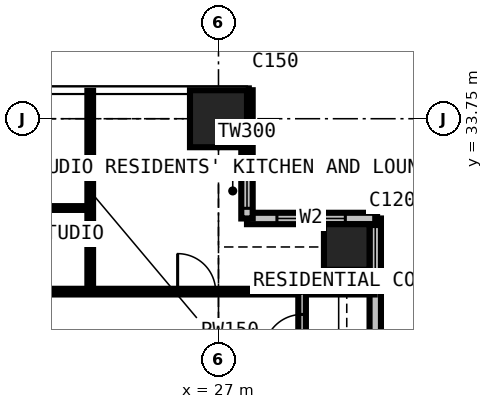
"""IFC4 building model, lengths in metres.
Left out: names, types, materials, properties, quantities, classifications, styles, units other than length and angle.
Written with IfcOpenShell. Run it as: python <this file> out.ifc"""

import sys

from ifc_helpers import new_model, si_unit, direction, frame, frame_2d, origin, origin_2d, place, context, subcontext, project, spatial, rectangle, extrude, element, fill, save


model = new_model("IFC4")
c1 = context("Model", 3, precision=1e-05, world=origin(), true_north=direction((0.0, 1.0)))
c2 = subcontext(c1, "Body", "Model", "MODEL_VIEW")
j1 = project(units=[si_unit("LENGTHUNIT", "METRE"), si_unit("PLANEANGLEUNIT", "RADIAN")], contexts=[c1])
p1 = place(None, origin())
s1 = spatial("IfcSite", under=j1, at=p1, CompositionType="ELEMENT")
p2 = place(p1, origin())
s2 = spatial("IfcBuilding", under=s1, at=p2, CompositionType="ELEMENT")
p3 = place(p2, frame((0.0, 0.0, 160.2)))
s3 = spatial("IfcBuildingStorey", under=s2, at=p3, CompositionType="ELEMENT", Elevation=160.2)
p4 = place(p3, frame((27.0, 33.75, 0.0), z_axis=(0.0, 0.0, 1.0), x_axis=(1.0, 0.0, 0.0)))
e1 = element("IfcColumn", 1, at=p4, inside=s3, PredefinedType="COLUMN", context=c2, shape_type="SweptSolid", body=[
    extrude(rectangle(XDim=1.5, YDim=1.5, at=origin_2d()), origin(), (0.0, 0.0, 1.0), 3.6),
])
p5 = place(p3, frame((30.375, 30.375, 0.0), z_axis=(0.0, 0.0, 1.0), x_axis=(1.0, 0.0, 0.0)))
e2 = element("IfcColumn", 2, at=p5, inside=s3, PredefinedType="COLUMN", context=c2, shape_type="SweptSolid", body=[
    extrude(rectangle(XDim=1.2, YDim=1.2, at=origin_2d()), origin(), (0.0, 0.0, 1.0), 3.6),
])
p6 = place(p3, frame((31.125, 27.75, 0.0), z_axis=(0.0, 0.0, 1.0), x_axis=(0.0, 1.0, 0.0)))
e3 = element("IfcWall", 3, at=p6, inside=s3, PredefinedType="SOLIDWALL", context=c2, shape_type="SweptSolid", body=[
    extrude(rectangle(XDim=3.375, YDim=0.3, at=frame_2d((1.688, 0.0))), origin(), (0.0, 0.0, 1.0), 3.375),
])
p7 = place(p6, frame((1.663, 0.0, 0.9)))
e4 = element("IfcOpeningElement", 4, at=p7, cuts=e3, PredefinedType="OPENING", context=c2, shape_type="SweptSolid", body=[
    extrude(rectangle(XDim=1.5, YDim=1.8, at=frame_2d((0.75, 0.9))), frame((0.0, 0.16, 0.0), z_axis=(0.0, -1.0, 0.0), x_axis=(1.0, 0.0, 0.0)), (0.0, 0.0, 1.0), 0.32),
])
p8 = place(p3, frame((31.125, 31.125, 0.0), z_axis=(0.0, 0.0, 1.0), x_axis=(-1.0, 0.0, 0.0)))
e5 = element("IfcWall", 5, at=p8, inside=s3, PredefinedType="SOLIDWALL", context=c2, shape_type="SweptSolid", body=[
    extrude(rectangle(XDim=3.375, YDim=0.3, at=frame_2d((1.688, 0.0))), origin(), (0.0, 0.0, 1.0), 3.375),
])
p9 = place(p8, frame((0.788, 0.0, 0.6)))
e6 = element("IfcOpeningElement", 6, at=p9, cuts=e5, PredefinedType="OPENING", context=c2, shape_type="SweptSolid", body=[
    extrude(rectangle(XDim=1.8, YDim=2.1, at=frame_2d((0.9, 1.05))), frame((0.0, 0.16, 0.0), z_axis=(0.0, -1.0, 0.0), x_axis=(1.0, 0.0, 0.0)), (0.0, 0.0, 1.0), 0.32),
])
p10 = place(p3, frame((27.75, 31.125, 0.0), z_axis=(0.0, 0.0, 1.0), x_axis=(0.0, 1.0, 0.0)))
e7 = element("IfcWall", 7, at=p10, inside=s3, PredefinedType="SOLIDWALL", context=c2, shape_type="SweptSolid", body=[
    extrude(rectangle(XDim=3.375, YDim=0.3, at=frame_2d((1.688, 0.0))), origin(), (0.0, 0.0, 1.0), 3.375),
])
p11 = place(p10, frame((0.268, 0.0, 0.9)))
e8 = element("IfcOpeningElement", 8, at=p11, cuts=e7, PredefinedType="OPENING", context=c2, shape_type="SweptSolid", body=[
    extrude(rectangle(XDim=1.5, YDim=1.8, at=frame_2d((0.75, 0.9))), frame((0.0, 0.16, 0.0), z_axis=(0.0, -1.0, 0.0), x_axis=(1.0, 0.0, 0.0)), (0.0, 0.0, 1.0), 0.32),
])
p12 = place(p3, frame((11.3, 29.2, 0.0), z_axis=(0.0, 0.0, 1.0), x_axis=(1.0, 0.0, 0.0)))
e9 = element("IfcWall", 9, at=p12, inside=s3, PredefinedType="PARTITIONING", context=c2, shape_type="SweptSolid", body=[
    extrude(rectangle(XDim=19.809, YDim=0.15, at=frame_2d((9.904, 0.0))), origin(), (0.0, 0.0, 1.0), 3.375),
])
p13 = place(p12, frame((14.625, 0.0, 0.0)))
e10 = element("IfcOpeningElement", 10, at=p13, cuts=e9, PredefinedType="OPENING", context=c2, shape_type="SweptSolid", body=[
    extrude(rectangle(XDim=1.0, YDim=2.2, at=frame_2d((0.5, 1.1))), frame((0.0, 0.085, 0.0), z_axis=(0.0, -1.0, 0.0), x_axis=(1.0, 0.0, 0.0)), (0.0, 0.0, 1.0), 0.17),
])
p14 = place(p12, frame((5.825, 0.0, 0.0)))
e11 = element("IfcOpeningElement", 11, at=p14, cuts=e9, PredefinedType="OPENING", context=c2, shape_type="SweptSolid", body=[
    extrude(rectangle(XDim=0.95, YDim=2.2, at=frame_2d((0.475, 1.1))), frame((0.0, 0.085, 0.0), z_axis=(0.0, -1.0, 0.0), x_axis=(1.0, 0.0, 0.0)), (0.0, 0.0, 1.0), 0.17),
])
p15 = place(p12, frame((9.2, 0.0, 0.0)))
e12 = element("IfcOpeningElement", 12, at=p15, cuts=e9, PredefinedType="OPENING", context=c2, shape_type="SweptSolid", body=[
    extrude(rectangle(XDim=0.95, YDim=2.2, at=frame_2d((0.475, 1.1))), frame((0.0, 0.085, 0.0), z_axis=(0.0, -1.0, 0.0), x_axis=(1.0, 0.0, 0.0)), (0.0, 0.0, 1.0), 0.17),
])
p16 = place(p12, frame((0.6, 0.0, 0.0)))
e13 = element("IfcOpeningElement", 13, at=p16, cuts=e9, PredefinedType="OPENING", context=c2, shape_type="SweptSolid", body=[
    extrude(rectangle(XDim=1.0, YDim=2.2, at=frame_2d((0.5, 1.1))), frame((0.0, 0.085, 0.0), z_axis=(0.0, -1.0, 0.0), x_axis=(1.0, 0.0, 0.0)), (0.0, 0.0, 1.0), 0.17),
])
p17 = place(p3, frame((21.625, 31.4, 0.0), z_axis=(0.0, 0.0, 1.0), x_axis=(1.0, 0.0, 0.0)))
e14 = element("IfcWall", 14, at=p17, inside=s3, PredefinedType="PARTITIONING", context=c2, shape_type="SweptSolid", body=[
    extrude(rectangle(XDim=2.0, YDim=0.1, at=frame_2d((1.0, 0.0))), origin(), (0.0, 0.0, 1.0), 3.375),
])
p18 = place(p3, frame((23.625, 29.2, 0.0), z_axis=(0.0, 0.0, 1.0), x_axis=(0.0, 1.0, 0.0)))
e15 = element("IfcWall", 15, at=p18, inside=s3, PredefinedType="PARTITIONING", context=c2, shape_type="SweptSolid", body=[
    extrude(rectangle(XDim=5.284, YDim=0.15, at=frame_2d((2.642, 0.0))), origin(), (0.0, 0.0, 1.0), 3.375),
])
p19 = place(p3, frame((29.2, 11.3, 0.0), z_axis=(0.0, 0.0, 1.0), x_axis=(0.0, 1.0, 0.0)))
e16 = element("IfcWall", 16, at=p19, inside=s3, PredefinedType="PARTITIONING", context=c2, shape_type="SweptSolid", body=[
    extrude(rectangle(XDim=17.9, YDim=0.2, at=frame_2d((8.95, 0.0))), origin(), (0.0, 0.0, 1.0), 3.375),
])
p20 = place(p19, frame((10.55, 0.0, 0.0)))
e17 = element("IfcOpeningElement", 17, at=p20, cuts=e16, PredefinedType="OPENING", context=c2, shape_type="SweptSolid", body=[
    extrude(rectangle(XDim=0.95, YDim=2.2, at=frame_2d((0.475, 1.1))), frame((0.0, 0.11, 0.0), z_axis=(0.0, -1.0, 0.0), x_axis=(1.0, 0.0, 0.0)), (0.0, 0.0, 1.0), 0.22),
])
p21 = place(p19, frame((5.775, 0.0, 0.0)))
e18 = element("IfcOpeningElement", 18, at=p21, cuts=e16, PredefinedType="OPENING", context=c2, shape_type="SweptSolid", body=[
    extrude(rectangle(XDim=0.95, YDim=2.2, at=frame_2d((0.475, 1.1))), frame((0.0, 0.11, 0.0), z_axis=(0.0, -1.0, 0.0), x_axis=(1.0, 0.0, 0.0)), (0.0, 0.0, 1.0), 0.22),
])
p22 = place(p19, frame((16.3, 0.0, 0.0)))
e19 = element("IfcOpeningElement", 19, at=p22, cuts=e16, PredefinedType="OPENING", context=c2, shape_type="SweptSolid", body=[
    extrude(rectangle(XDim=1.0, YDim=2.2, at=frame_2d((0.5, 1.1))), frame((0.0, 0.11, 0.0), z_axis=(0.0, -1.0, 0.0), x_axis=(1.0, 0.0, 0.0)), (0.0, 0.0, 1.0), 0.22),
])
p23 = place(p7, origin())
e20 = element("IfcWindow", 20, at=p23, inside=s3, PartitioningType="SINGLE_PANEL", PredefinedType="WINDOW", context=c2, shape_type="SweptSolid", body=[
    extrude(rectangle(XDim=1.5, YDim=1.8, at=frame_2d((0.75, 0.9))), frame((0.0, 0.03, 0.0), z_axis=(0.0, -1.0, 0.0), x_axis=(1.0, 0.0, 0.0)), (0.0, 0.0, 1.0), 0.06),
])
fill(e4, e20)
p24 = place(p9, origin())
e21 = element("IfcWindow", 21, at=p24, inside=s3, PartitioningType="SINGLE_PANEL", PredefinedType="WINDOW", context=c2, shape_type="SweptSolid", body=[
    extrude(rectangle(XDim=1.8, YDim=2.1, at=frame_2d((0.9, 1.05))), frame((0.0, 0.03, 0.0), z_axis=(0.0, -1.0, 0.0), x_axis=(1.0, 0.0, 0.0)), (0.0, 0.0, 1.0), 0.06),
])
fill(e6, e21)
p25 = place(p11, origin())
e22 = element("IfcWindow", 22, at=p25, inside=s3, PartitioningType="SINGLE_PANEL", PredefinedType="WINDOW", context=c2, shape_type="SweptSolid", body=[
    extrude(rectangle(XDim=1.5, YDim=1.8, at=frame_2d((0.75, 0.9))), frame((0.0, 0.03, 0.0), z_axis=(0.0, -1.0, 0.0), x_axis=(1.0, 0.0, 0.0)), (0.0, 0.0, 1.0), 0.06),
])
fill(e8, e22)
p26 = place(p22, origin())
e23 = element("IfcDoor", 23, at=p26, inside=s3, OperationType="SINGLE_SWING_LEFT", PredefinedType="DOOR", context=c2, shape_type="SweptSolid", body=[
    extrude(rectangle(XDim=1.0, YDim=2.2, at=frame_2d((0.5, 1.1))), frame((0.0, 0.025, 0.0), z_axis=(0.0, -1.0, 0.0), x_axis=(1.0, 0.0, 0.0)), (0.0, 0.0, 1.0), 0.05),
])
fill(e19, e23)
p27 = place(p13, origin())
e24 = element("IfcDoor", 24, at=p27, inside=s3, OperationType="SINGLE_SWING_LEFT", PredefinedType="DOOR", context=c2, shape_type="SweptSolid", body=[
    extrude(rectangle(XDim=1.0, YDim=2.2, at=frame_2d((0.5, 1.1))), frame((0.0, 0.025, 0.0), z_axis=(0.0, -1.0, 0.0), x_axis=(1.0, 0.0, 0.0)), (0.0, 0.0, 1.0), 0.05),
])
fill(e10, e24)
save(model, sys.argv[1])
